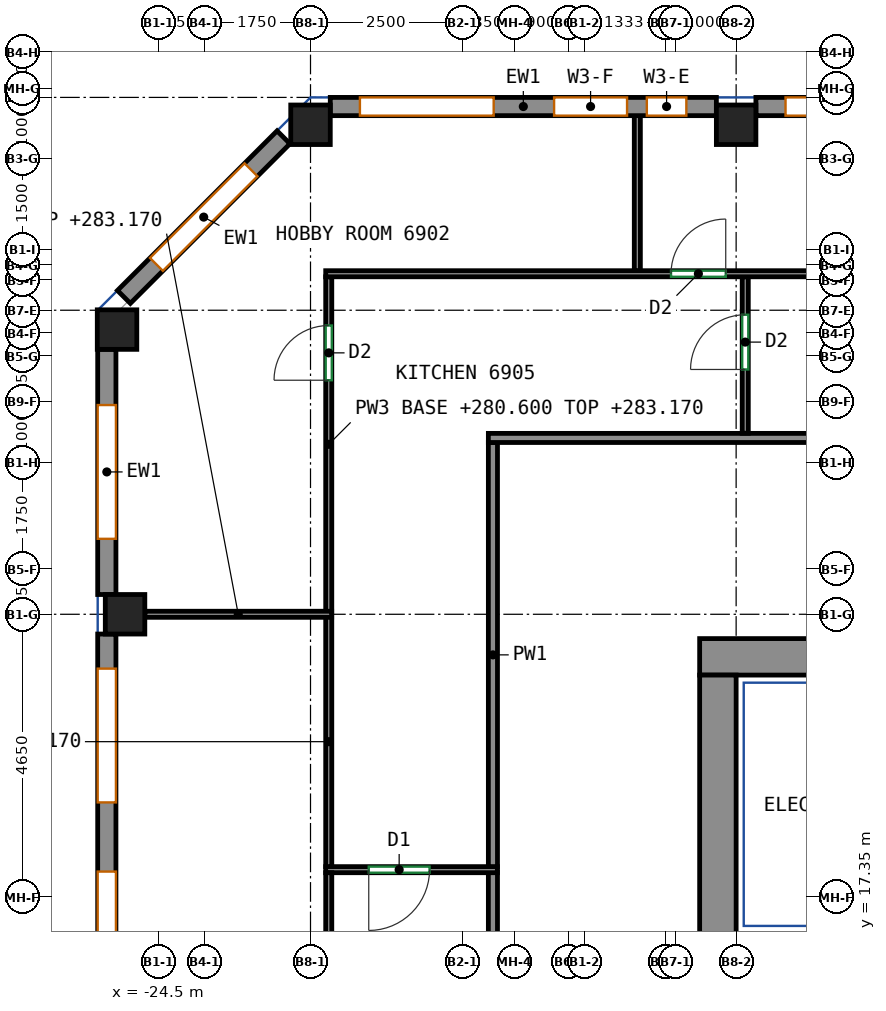
"""IFC4 building model, lengths in metres.
Left out: names, types, materials, properties, quantities, classifications, styles, units other than length and angle.
Written with IfcOpenShell. Run it as: python <this file> out.ifc"""

import sys

from ifc_helpers import new_model, si_unit, direction, frame, frame_2d, origin, origin_2d, place, context, subcontext, project, spatial, rectangle, extrude, source, transform, mapped, element, fill, save


model = new_model("IFC4")
c1 = context("Model", 3, precision=1e-05, world=origin(), true_north=direction((0.0, 1.0)))
c2 = subcontext(c1, "Body", "Model", "MODEL_VIEW")
j1 = project(units=[si_unit("LENGTHUNIT", "METRE"), si_unit("PLANEANGLEUNIT", "RADIAN")], contexts=[c1])
p1 = place(None, origin())
s1 = spatial("IfcSite", under=j1, at=p1, CompositionType="ELEMENT")
p2 = place(p1, origin())
s2 = spatial("IfcBuilding", under=s1, at=p2, CompositionType="ELEMENT")
p3 = place(p2, frame((0.0, 0.0, 280.6)))
s3 = spatial("IfcBuildingStorey", under=s2, at=p3, CompositionType="ELEMENT", Elevation=280.6)
m1 = source(origin(), c2, "Body", "SweptSolid", [
    extrude(rectangle(XDim=0.65, YDim=0.65, at=origin_2d()), origin(), (0.0, 0.0, 1.0), 3.12),
])
for number, where, z_axis, x_axis in (
    (1, (-25.182, 26.682, 0.0), (0.0, 0.0, 1.0), (1.0, 0.0, 0.0)),
    (2, (-25.05, 22.0, 0.0), (0.0, 0.0, 1.0), (1.0, 0.0, 0.0)),
    (3, (-22.0, 30.05, 0.0), (0.0, 0.0, 1.0), (1.0, 0.0, 0.0)),
    (4, (-15.0, 30.05, 0.0), (0.0, 0.0, 1.0), (1.0, 0.0, 0.0)),
):
    element("IfcColumn", number, at=place(p3, frame(where, z_axis=z_axis, x_axis=x_axis)), inside=s3, PredefinedType="COLUMN", context=c2, shape_type="MappedRepresentation", body=[
        mapped(m1, transform((0.0, 0.0, 0.0))),
    ])
m2 = source(origin(), c2, "Body", "SweptSolid", [
    extrude(rectangle(XDim=33.3, YDim=0.6, at=frame_2d((16.65, 0.0))), origin(), (0.0, 0.0, 1.0), 3.12),
])
p4 = place(p3, frame((-15.6, 21.3, 0.0), z_axis=(0.0, 0.0, 1.0), x_axis=(1.0, 0.0, 0.0)))
e5 = element("IfcWall", 5, at=p4, inside=s3, PredefinedType="SHEAR", context=c2, shape_type="MappedRepresentation", body=[
    mapped(m2, transform((0.0, 0.0, 0.0))),
])
p5 = place(p4, frame((8.12, 0.0, 0.0)))
e6 = element("IfcOpeningElement", 6, at=p5, cuts=e5, PredefinedType="OPENING", context=c2, shape_type="SweptSolid", body=[
    extrude(rectangle(XDim=0.9, YDim=2.1, at=frame_2d((0.45, 1.05))), frame((0.0, 0.31, 0.0), z_axis=(0.0, -1.0, 0.0), x_axis=(1.0, 0.0, 0.0)), (0.0, 0.0, 1.0), 0.62),
])
p6 = place(p4, frame((14.15, 0.0, 0.0)))
e7 = element("IfcOpeningElement", 7, at=p6, cuts=e5, PredefinedType="OPENING", context=c2, shape_type="SweptSolid", body=[
    extrude(rectangle(XDim=0.9, YDim=2.1, at=frame_2d((0.45, 1.05))), frame((0.0, 0.31, 0.0), z_axis=(0.0, -1.0, 0.0), x_axis=(1.0, 0.0, 0.0)), (0.0, 0.0, 1.0), 0.62),
])
p7 = place(p4, frame((18.974, 0.0, 0.0)))
e8 = element("IfcOpeningElement", 8, at=p7, cuts=e5, PredefinedType="OPENING", context=c2, shape_type="SweptSolid", body=[
    extrude(rectangle(XDim=0.9, YDim=2.1, at=frame_2d((0.45, 1.05))), frame((0.0, 0.31, 0.0), z_axis=(0.0, -1.0, 0.0), x_axis=(1.0, 0.0, 0.0)), (0.0, 0.0, 1.0), 0.62),
])
p8 = place(p4, frame((23.664, 0.0, 0.0)))
e9 = element("IfcOpeningElement", 9, at=p8, cuts=e5, PredefinedType="OPENING", context=c2, shape_type="SweptSolid", body=[
    extrude(rectangle(XDim=0.9, YDim=2.1, at=frame_2d((0.45, 1.05))), frame((0.0, 0.31, 0.0), z_axis=(0.0, -1.0, 0.0), x_axis=(1.0, 0.0, 0.0)), (0.0, 0.0, 1.0), 0.62),
])
p9 = place(p4, frame((26.92, 0.0, 0.0)))
e10 = element("IfcOpeningElement", 10, at=p9, cuts=e5, PredefinedType="OPENING", context=c2, shape_type="SweptSolid", body=[
    extrude(rectangle(XDim=0.9, YDim=2.1, at=frame_2d((0.45, 1.05))), frame((0.0, 0.31, 0.0), z_axis=(0.0, -1.0, 0.0), x_axis=(1.0, 0.0, 0.0)), (0.0, 0.0, 1.0), 0.62),
])
p10 = place(p4, frame((2.125, 0.0, 0.0)))
e11 = element("IfcOpeningElement", 11, at=p10, cuts=e5, PredefinedType="OPENING", context=c2, shape_type="SweptSolid", body=[
    extrude(rectangle(XDim=0.9, YDim=2.1, at=frame_2d((0.45, 1.05))), frame((0.0, 0.31, 0.0), z_axis=(0.0, -1.0, 0.0), x_axis=(1.0, 0.0, 0.0)), (0.0, 0.0, 1.0), 0.62),
])
p11 = place(p4, frame((30.275, 0.0, 0.0)))
e12 = element("IfcOpeningElement", 12, at=p11, cuts=e5, PredefinedType="OPENING", context=c2, shape_type="SweptSolid", body=[
    extrude(rectangle(XDim=0.9, YDim=2.1, at=frame_2d((0.45, 1.05))), frame((0.0, 0.31, 0.0), z_axis=(0.0, -1.0, 0.0), x_axis=(1.0, 0.0, 0.0)), (0.0, 0.0, 1.0), 0.62),
])
m3 = source(origin(), c2, "Body", "SweptSolid", [
    extrude(rectangle(XDim=12.0, YDim=0.6, at=frame_2d((6.0, 0.0))), origin(), (0.0, 0.0, 1.0), 3.12),
])
p12 = place(p3, frame((-15.3, 9.0, 0.0), z_axis=(0.0, 0.0, 1.0), x_axis=(0.0, 1.0, 0.0)))
e13 = element("IfcWall", 13, at=p12, inside=s3, PredefinedType="SHEAR", context=c2, shape_type="MappedRepresentation", body=[
    mapped(m3, transform((0.0, 0.0, 0.0))),
])
m4 = source(origin(), c2, "Body", "SweptSolid", [
    extrude(rectangle(XDim=6.35, YDim=0.3, at=frame_2d((3.175, 0.0))), origin(), (0.0, 0.0, 1.0), 3.12),
])
p13 = place(p3, frame((-8.325, 30.35, 0.0), z_axis=(0.0, 0.0, 1.0), x_axis=(-1.0, 0.0, 0.0)))
e14 = element("IfcWall", 14, at=p13, inside=s3, PredefinedType="SOLIDWALL", context=c2, shape_type="MappedRepresentation", body=[
    mapped(m4, transform((0.0, 0.0, 0.0))),
])
p14 = place(p13, frame((0.488, 0.0, 0.8)))
e15 = element("IfcOpeningElement", 15, at=p14, cuts=e14, PredefinedType="OPENING", context=c2, shape_type="SweptSolid", body=[
    extrude(rectangle(XDim=2.2, YDim=2.05, at=frame_2d((1.1, 1.025))), frame((0.0, 0.16, 0.0), z_axis=(0.0, -1.0, 0.0), x_axis=(1.0, 0.0, 0.0)), (0.0, 0.0, 1.0), 0.32),
])
p15 = place(p13, frame((3.663, 0.0, 0.8)))
e16 = element("IfcOpeningElement", 16, at=p15, cuts=e14, PredefinedType="OPENING", context=c2, shape_type="SweptSolid", body=[
    extrude(rectangle(XDim=2.2, YDim=2.05, at=frame_2d((1.1, 1.025))), frame((0.0, 0.16, 0.0), z_axis=(0.0, -1.0, 0.0), x_axis=(1.0, 0.0, 0.0)), (0.0, 0.0, 1.0), 0.32),
])
p16 = place(p3, frame((-15.325, 30.35, 0.0), z_axis=(0.0, 0.0, 1.0), x_axis=(-1.0, 0.0, 0.0)))
e17 = element("IfcWall", 17, at=p16, inside=s3, PredefinedType="SOLIDWALL", context=c2, shape_type="MappedRepresentation", body=[
    mapped(m4, transform((0.0, 0.0, 0.0))),
])
p17 = place(p16, frame((0.494, 0.0, 0.8)))
e18 = element("IfcOpeningElement", 18, at=p17, cuts=e17, PredefinedType="OPENING", context=c2, shape_type="SweptSolid", body=[
    extrude(rectangle(XDim=0.65, YDim=2.05, at=frame_2d((0.325, 1.025))), frame((0.0, 0.16, 0.0), z_axis=(0.0, -1.0, 0.0), x_axis=(1.0, 0.0, 0.0)), (0.0, 0.0, 1.0), 0.32),
])
p18 = place(p16, frame((3.663, 0.0, 0.8)))
e19 = element("IfcOpeningElement", 19, at=p18, cuts=e17, PredefinedType="OPENING", context=c2, shape_type="SweptSolid", body=[
    extrude(rectangle(XDim=2.2, YDim=2.05, at=frame_2d((1.1, 1.025))), frame((0.0, 0.16, 0.0), z_axis=(0.0, -1.0, 0.0), x_axis=(1.0, 0.0, 0.0)), (0.0, 0.0, 1.0), 0.32),
])
p19 = place(p16, frame((1.469, 0.0, 0.8)))
e20 = element("IfcOpeningElement", 20, at=p19, cuts=e17, PredefinedType="OPENING", context=c2, shape_type="SweptSolid", body=[
    extrude(rectangle(XDim=1.2, YDim=2.05, at=frame_2d((0.6, 1.025))), frame((0.0, 0.16, 0.0), z_axis=(0.0, -1.0, 0.0), x_axis=(1.0, 0.0, 0.0)), (0.0, 0.0, 1.0), 0.32),
])
m5 = source(origin(), c2, "Body", "SweptSolid", [
    extrude(rectangle(XDim=3.712, YDim=0.3, at=frame_2d((1.856, 0.0))), origin(), (0.0, 0.0, 1.0), 3.12),
])
p20 = place(p3, frame((-22.444, 29.844, 0.0), z_axis=(0.0, 0.0, 1.0), x_axis=(-0.707106781187, -0.707106781187, 0.0)))
e21 = element("IfcWall", 21, at=p20, inside=s3, PredefinedType="SOLIDWALL", context=c2, shape_type="MappedRepresentation", body=[
    mapped(m5, transform((0.0, 0.0, 0.0))),
])
p21 = place(p20, frame((0.756, 0.0, 0.8)))
e22 = element("IfcOpeningElement", 22, at=p21, cuts=e21, PredefinedType="OPENING", context=c2, shape_type="SweptSolid", body=[
    extrude(rectangle(XDim=2.2, YDim=2.05, at=frame_2d((1.1, 1.025))), frame((0.0, 0.16, 0.0), z_axis=(0.0, -1.0, 0.0), x_axis=(1.0, 0.0, 0.0)), (0.0, 0.0, 1.0), 0.32),
])
m6 = source(origin(), c2, "Body", "SweptSolid", [
    extrude(rectangle(XDim=4.032, YDim=0.3, at=frame_2d((2.016, 0.0))), origin(), (0.0, 0.0, 1.0), 3.12),
])
p22 = place(p3, frame((-25.35, 26.357, 0.0), z_axis=(0.0, 0.0, 1.0), x_axis=(0.0, -1.0, 0.0)))
e23 = element("IfcWall", 23, at=p22, inside=s3, PredefinedType="SOLIDWALL", context=c2, shape_type="MappedRepresentation", body=[
    mapped(m6, transform((0.0, 0.0, 0.0))),
])
p23 = place(p22, frame((0.916, 0.0, 0.8)))
e24 = element("IfcOpeningElement", 24, at=p23, cuts=e23, PredefinedType="OPENING", context=c2, shape_type="SweptSolid", body=[
    extrude(rectangle(XDim=2.2, YDim=2.05, at=frame_2d((1.1, 1.025))), frame((0.0, 0.16, 0.0), z_axis=(0.0, -1.0, 0.0), x_axis=(1.0, 0.0, 0.0)), (0.0, 0.0, 1.0), 0.32),
])
m7 = source(origin(), c2, "Body", "SweptSolid", [
    extrude(rectangle(XDim=13.35, YDim=0.3, at=frame_2d((6.675, 0.0))), origin(), (0.0, 0.0, 1.0), 3.12),
])
p24 = place(p3, frame((-25.35, 21.675, 0.0), z_axis=(0.0, 0.0, 1.0), x_axis=(0.0, -1.0, 0.0)))
e25 = element("IfcWall", 25, at=p24, inside=s3, PredefinedType="SOLIDWALL", context=c2, shape_type="MappedRepresentation", body=[
    mapped(m7, transform((0.0, 0.0, 0.0))),
])
p25 = place(p24, frame((0.569, 0.0, 0.8)))
e26 = element("IfcOpeningElement", 26, at=p25, cuts=e25, PredefinedType="OPENING", context=c2, shape_type="SweptSolid", body=[
    extrude(rectangle(XDim=2.2, YDim=2.05, at=frame_2d((1.1, 1.025))), frame((0.0, 0.16, 0.0), z_axis=(0.0, -1.0, 0.0), x_axis=(1.0, 0.0, 0.0)), (0.0, 0.0, 1.0), 0.32),
])
p26 = place(p24, frame((3.906, 0.0, 0.8)))
e27 = element("IfcOpeningElement", 27, at=p26, cuts=e25, PredefinedType="OPENING", context=c2, shape_type="SweptSolid", body=[
    extrude(rectangle(XDim=2.2, YDim=2.05, at=frame_2d((1.1, 1.025))), frame((0.0, 0.16, 0.0), z_axis=(0.0, -1.0, 0.0), x_axis=(1.0, 0.0, 0.0)), (0.0, 0.0, 1.0), 0.32),
])
p27 = place(p24, frame((7.244, 0.0, 0.8)))
e28 = element("IfcOpeningElement", 28, at=p27, cuts=e25, PredefinedType="OPENING", context=c2, shape_type="SweptSolid", body=[
    extrude(rectangle(XDim=2.2, YDim=2.05, at=frame_2d((1.1, 1.025))), frame((0.0, 0.16, 0.0), z_axis=(0.0, -1.0, 0.0), x_axis=(1.0, 0.0, 0.0)), (0.0, 0.0, 1.0), 0.32),
])
p28 = place(p24, frame((10.581, 0.0, 0.8)))
e29 = element("IfcOpeningElement", 29, at=p28, cuts=e25, PredefinedType="OPENING", context=c2, shape_type="SweptSolid", body=[
    extrude(rectangle(XDim=2.2, YDim=2.05, at=frame_2d((1.1, 1.025))), frame((0.0, 0.16, 0.0), z_axis=(0.0, -1.0, 0.0), x_axis=(1.0, 0.0, 0.0)), (0.0, 0.0, 1.0), 0.32),
])
p29 = place(p3, frame((-19.0, 8.09, 0.0), z_axis=(0.0, 0.0, 1.0), x_axis=(0.0, 1.0, 0.0)))
e30 = element("IfcWall", 30, at=p29, inside=s3, PredefinedType="PARTITIONING", context=c2, shape_type="SweptSolid", body=[
    extrude(rectangle(XDim=9.67, YDim=0.15, at=frame_2d((4.835, 0.0))), origin(), (0.0, 0.0, 1.0), 3.12),
])
p30 = place(p29, frame((3.629, 0.0, 0.0)))
e31 = element("IfcOpeningElement", 31, at=p30, cuts=e30, PredefinedType="OPENING", context=c2, shape_type="SweptSolid", body=[
    extrude(rectangle(XDim=1.0, YDim=2.1, at=frame_2d((0.5, 1.05))), frame((0.0, 0.085, 0.0), z_axis=(0.0, -1.0, 0.0), x_axis=(1.0, 0.0, 0.0)), (0.0, 0.0, 1.0), 0.17),
])
p31 = place(p3, frame((-19.0, 17.84, 0.0), z_axis=(0.0, 0.0, 1.0), x_axis=(0.0, 1.0, 0.0)))
e32 = element("IfcWall", 32, at=p31, inside=s3, PredefinedType="PARTITIONING", context=c2, shape_type="SweptSolid", body=[
    extrude(rectangle(XDim=6.985, YDim=0.15, at=frame_2d((3.492, 0.0))), origin(), (0.0, 0.0, 1.0), 3.12),
])
p32 = place(p3, frame((-19.075, 24.9, 0.0), z_axis=(0.0, 0.0, 1.0), x_axis=(1.0, 0.0, 0.0)))
e33 = element("IfcWall", 33, at=p32, inside=s3, PredefinedType="PARTITIONING", context=c2, shape_type="SweptSolid", body=[
    extrude(rectangle(XDim=39.75, YDim=0.15, at=frame_2d((19.875, 0.0))), origin(), (0.0, 0.0, 1.0), 3.12),
])
p33 = place(p32, frame((11.365, 0.0, 0.0)))
e34 = element("IfcOpeningElement", 34, at=p33, cuts=e33, PredefinedType="OPENING", context=c2, shape_type="SweptSolid", body=[
    extrude(rectangle(XDim=1.0, YDim=2.1, at=frame_2d((0.5, 1.05))), frame((0.0, 0.085, 0.0), z_axis=(0.0, -1.0, 0.0), x_axis=(1.0, 0.0, 0.0)), (0.0, 0.0, 1.0), 0.17),
])
p34 = place(p32, frame((33.379, 0.0, 0.0)))
e35 = element("IfcOpeningElement", 35, at=p34, cuts=e33, PredefinedType="OPENING", context=c2, shape_type="SweptSolid", body=[
    extrude(rectangle(XDim=0.9, YDim=2.1, at=frame_2d((0.45, 1.05))), frame((0.0, 0.085, 0.0), z_axis=(0.0, -1.0, 0.0), x_axis=(1.0, 0.0, 0.0)), (0.0, 0.0, 1.0), 0.17),
])
p35 = place(p3, frame((-18.927, 17.8, 0.0), z_axis=(0.0, 0.0, 1.0), x_axis=(-1.0, 0.0, 0.0)))
e36 = element("IfcWall", 36, at=p35, inside=s3, PredefinedType="PARTITIONING", context=c2, shape_type="SweptSolid", body=[
    extrude(rectangle(XDim=2.823, YDim=0.1, at=frame_2d((1.412, 0.0))), origin(), (0.0, 0.0, 1.0), 3.12),
])
p36 = place(p35, frame((1.115, 0.0, 0.0)))
e37 = element("IfcOpeningElement", 37, at=p36, cuts=e36, PredefinedType="OPENING", context=c2, shape_type="SweptSolid", body=[
    extrude(rectangle(XDim=1.0, YDim=2.1, at=frame_2d((0.5, 1.05))), frame((0.0, 0.06, 0.0), z_axis=(0.0, -1.0, 0.0), x_axis=(1.0, 0.0, 0.0)), (0.0, 0.0, 1.0), 0.12),
])
p37 = place(p3, frame((-21.7, 8.1, 0.0), z_axis=(0.0, 0.0, 1.0), x_axis=(0.0, 1.0, 0.0)))
e38 = element("IfcWall", 38, at=p37, inside=s3, PredefinedType="PARTITIONING", context=c2, shape_type="SweptSolid", body=[
    extrude(rectangle(XDim=9.65, YDim=0.1, at=frame_2d((4.825, 0.0))), origin(), (0.0, 0.0, 1.0), 2.57),
])
p38 = place(p37, frame((7.041, 0.0, 0.0)))
e39 = element("IfcOpeningElement", 39, at=p38, cuts=e38, PredefinedType="OPENING", context=c2, shape_type="SweptSolid", body=[
    extrude(rectangle(XDim=1.0, YDim=2.1, at=frame_2d((0.5, 1.05))), frame((0.0, 0.06, 0.0), z_axis=(0.0, -1.0, 0.0), x_axis=(1.0, 0.0, 0.0)), (0.0, 0.0, 1.0), 0.12),
])
p39 = place(p3, frame((-14.85, 24.977, 0.0), z_axis=(0.0, 0.0, 1.0), x_axis=(0.0, 1.0, 0.0)))
e40 = element("IfcWall", 40, at=p39, inside=s3, PredefinedType="PARTITIONING", context=c2, shape_type="SweptSolid", body=[
    extrude(rectangle(XDim=2.573, YDim=0.1, at=frame_2d((1.287, 0.0))), origin(), (0.0, 0.0, 1.0), 3.12),
])
p40 = place(p39, frame((1.049, 0.0, 0.0)))
e41 = element("IfcOpeningElement", 41, at=p40, cuts=e40, PredefinedType="OPENING", context=c2, shape_type="SweptSolid", body=[
    extrude(rectangle(XDim=0.9, YDim=2.1, at=frame_2d((0.45, 1.05))), frame((0.0, 0.06, 0.0), z_axis=(0.0, -1.0, 0.0), x_axis=(1.0, 0.0, 0.0)), (0.0, 0.0, 1.0), 0.12),
])
p41 = place(p3, frame((-21.7, 17.85, 0.0), z_axis=(0.0, 0.0, 1.0), x_axis=(0.0, 1.0, 0.0)))
e42 = element("IfcWall", 42, at=p41, inside=s3, PredefinedType="PARTITIONING", context=c2, shape_type="SweptSolid", body=[
    extrude(rectangle(XDim=4.11, YDim=0.1, at=frame_2d((2.055, 0.0))), origin(), (0.0, 0.0, 1.0), 2.57),
])
p42 = place(p3, frame((-21.7, 22.04, 0.0), z_axis=(0.0, 0.0, 1.0), x_axis=(0.0, 1.0, 0.0)))
e43 = element("IfcWall", 43, at=p42, inside=s3, PredefinedType="PARTITIONING", context=c2, shape_type="SweptSolid", body=[
    extrude(rectangle(XDim=5.51, YDim=0.1, at=frame_2d((2.755, 0.0))), origin(), (0.0, 0.0, 1.0), 2.57),
])
p43 = place(p42, frame((3.809, 0.0, 0.0)))
e44 = element("IfcOpeningElement", 44, at=p43, cuts=e43, PredefinedType="OPENING", context=c2, shape_type="SweptSolid", body=[
    extrude(rectangle(XDim=0.9, YDim=2.1, at=frame_2d((0.45, 1.05))), frame((0.0, 0.06, 0.0), z_axis=(0.0, -1.0, 0.0), x_axis=(1.0, 0.0, 0.0)), (0.0, 0.0, 1.0), 0.12),
])
p44 = place(p3, frame((-21.75, 27.6, 0.0), z_axis=(0.0, 0.0, 1.0), x_axis=(1.0, 0.0, 0.0)))
e45 = element("IfcWall", 45, at=p44, inside=s3, PredefinedType="PARTITIONING", context=c2, shape_type="SweptSolid", body=[
    extrude(rectangle(XDim=13.85, YDim=0.1, at=frame_2d((6.925, 0.0))), origin(), (0.0, 0.0, 1.0), 3.12),
])
p45 = place(p44, frame((5.679, 0.0, 0.0)))
e46 = element("IfcOpeningElement", 46, at=p45, cuts=e45, PredefinedType="OPENING", context=c2, shape_type="SweptSolid", body=[
    extrude(rectangle(XDim=0.9, YDim=2.1, at=frame_2d((0.45, 1.05))), frame((0.0, 0.06, 0.0), z_axis=(0.0, -1.0, 0.0), x_axis=(1.0, 0.0, 0.0)), (0.0, 0.0, 1.0), 0.12),
])
p46 = place(p3, frame((-21.652, 22.0, 0.0), z_axis=(0.0, 0.0, 1.0), x_axis=(-1.0, 0.0, 0.0)))
e47 = element("IfcWall", 47, at=p46, inside=s3, PredefinedType="PARTITIONING", context=c2, shape_type="SweptSolid", body=[
    extrude(rectangle(XDim=3.073, YDim=0.1, at=frame_2d((1.537, 0.0))), origin(), (0.0, 0.0, 1.0), 2.57),
])
p47 = place(p3, frame((-16.625, 27.652, 0.0), z_axis=(0.0, 0.0, 1.0), x_axis=(0.0, 1.0, 0.0)))
e48 = element("IfcWall", 48, at=p47, inside=s3, PredefinedType="PARTITIONING", context=c2, shape_type="SweptSolid", body=[
    extrude(rectangle(XDim=2.598, YDim=0.1, at=frame_2d((1.299, 0.0))), origin(), (0.0, 0.0, 1.0), 3.12),
])
p48 = place(p15, origin())
e49 = element("IfcWindow", 49, at=p48, inside=s3, PartitioningType="SINGLE_PANEL", PredefinedType="WINDOW", context=c2, shape_type="SweptSolid", body=[
    extrude(rectangle(XDim=2.2, YDim=2.05, at=frame_2d((1.1, 1.025))), frame((0.0, 0.03, 0.0), z_axis=(0.0, -1.0, 0.0), x_axis=(1.0, 0.0, 0.0)), (0.0, 0.0, 1.0), 0.06),
])
fill(e16, e49)
p49 = place(p17, origin())
e50 = element("IfcWindow", 50, at=p49, inside=s3, PartitioningType="SINGLE_PANEL", PredefinedType="WINDOW", context=c2, shape_type="SweptSolid", body=[
    extrude(rectangle(XDim=0.65, YDim=2.05, at=frame_2d((0.325, 1.025))), frame((0.0, 0.03, 0.0), z_axis=(0.0, -1.0, 0.0), x_axis=(1.0, 0.0, 0.0)), (0.0, 0.0, 1.0), 0.06),
])
fill(e18, e50)
p50 = place(p18, origin())
e51 = element("IfcWindow", 51, at=p50, inside=s3, PartitioningType="SINGLE_PANEL", PredefinedType="WINDOW", context=c2, shape_type="SweptSolid", body=[
    extrude(rectangle(XDim=2.2, YDim=2.05, at=frame_2d((1.1, 1.025))), frame((0.0, 0.03, 0.0), z_axis=(0.0, -1.0, 0.0), x_axis=(1.0, 0.0, 0.0)), (0.0, 0.0, 1.0), 0.06),
])
fill(e19, e51)
p51 = place(p21, origin())
e52 = element("IfcWindow", 52, at=p51, inside=s3, PartitioningType="SINGLE_PANEL", PredefinedType="WINDOW", context=c2, shape_type="SweptSolid", body=[
    extrude(rectangle(XDim=2.2, YDim=2.05, at=frame_2d((1.1, 1.025))), frame((0.0, 0.03, 0.0), z_axis=(0.0, -1.0, 0.0), x_axis=(1.0, 0.0, 0.0)), (0.0, 0.0, 1.0), 0.06),
])
fill(e22, e52)
p52 = place(p23, origin())
e53 = element("IfcWindow", 53, at=p52, inside=s3, PartitioningType="SINGLE_PANEL", PredefinedType="WINDOW", context=c2, shape_type="SweptSolid", body=[
    extrude(rectangle(XDim=2.2, YDim=2.05, at=frame_2d((1.1, 1.025))), frame((0.0, 0.03, 0.0), z_axis=(0.0, -1.0, 0.0), x_axis=(1.0, 0.0, 0.0)), (0.0, 0.0, 1.0), 0.06),
])
fill(e24, e53)
p53 = place(p25, origin())
e54 = element("IfcWindow", 54, at=p53, inside=s3, PartitioningType="SINGLE_PANEL", PredefinedType="WINDOW", context=c2, shape_type="SweptSolid", body=[
    extrude(rectangle(XDim=2.2, YDim=2.05, at=frame_2d((1.1, 1.025))), frame((0.0, 0.03, 0.0), z_axis=(0.0, -1.0, 0.0), x_axis=(1.0, 0.0, 0.0)), (0.0, 0.0, 1.0), 0.06),
])
fill(e26, e54)
p54 = place(p26, origin())
e55 = element("IfcWindow", 55, at=p54, inside=s3, PartitioningType="SINGLE_PANEL", PredefinedType="WINDOW", context=c2, shape_type="SweptSolid", body=[
    extrude(rectangle(XDim=2.2, YDim=2.05, at=frame_2d((1.1, 1.025))), frame((0.0, 0.03, 0.0), z_axis=(0.0, -1.0, 0.0), x_axis=(1.0, 0.0, 0.0)), (0.0, 0.0, 1.0), 0.06),
])
fill(e27, e55)
p55 = place(p36, origin())
e56 = element("IfcDoor", 56, at=p55, inside=s3, OperationType="SINGLE_SWING_RIGHT", PredefinedType="DOOR", context=c2, shape_type="SweptSolid", body=[
    extrude(rectangle(XDim=1.0, YDim=2.1, at=frame_2d((0.5, 1.05))), frame((0.0, 0.025, 0.0), z_axis=(0.0, -1.0, 0.0), x_axis=(1.0, 0.0, 0.0)), (0.0, 0.0, 1.0), 0.05),
])
fill(e37, e56)
p56 = place(p43, origin())
e57 = element("IfcDoor", 57, at=p56, inside=s3, OperationType="SINGLE_SWING_LEFT", PredefinedType="DOOR", context=c2, shape_type="SweptSolid", body=[
    extrude(rectangle(XDim=0.9, YDim=2.1, at=frame_2d((0.45, 1.05))), frame((0.0, 0.025, 0.0), z_axis=(0.0, -1.0, 0.0), x_axis=(1.0, 0.0, 0.0)), (0.0, 0.0, 1.0), 0.05),
])
fill(e44, e57)
p57 = place(p40, origin())
e58 = element("IfcDoor", 58, at=p57, inside=s3, OperationType="SINGLE_SWING_LEFT", PredefinedType="DOOR", context=c2, shape_type="SweptSolid", body=[
    extrude(rectangle(XDim=0.9, YDim=2.1, at=frame_2d((0.45, 1.05))), frame((0.0, 0.025, 0.0), z_axis=(0.0, -1.0, 0.0), x_axis=(1.0, 0.0, 0.0)), (0.0, 0.0, 1.0), 0.05),
])
fill(e41, e58)
p58 = place(p45, origin())
e59 = element("IfcDoor", 59, at=p58, inside=s3, OperationType="SINGLE_SWING_RIGHT", PredefinedType="DOOR", context=c2, shape_type="SweptSolid", body=[
    extrude(rectangle(XDim=0.9, YDim=2.1, at=frame_2d((0.45, 1.05))), frame((0.0, 0.025, 0.0), z_axis=(0.0, -1.0, 0.0), x_axis=(1.0, 0.0, 0.0)), (0.0, 0.0, 1.0), 0.05),
])
fill(e46, e59)
p59 = place(p19, origin())
e60 = element("IfcWindow", 60, at=p59, inside=s3, PartitioningType="SINGLE_PANEL", PredefinedType="WINDOW", context=c2, shape_type="SweptSolid", body=[
    extrude(rectangle(XDim=1.2, YDim=2.05, at=frame_2d((0.6, 1.025))), frame((0.0, 0.03, 0.0), z_axis=(0.0, -1.0, 0.0), x_axis=(1.0, 0.0, 0.0)), (0.0, 0.0, 1.0), 0.06),
])
fill(e20, e60)
save(model, sys.argv[1])
